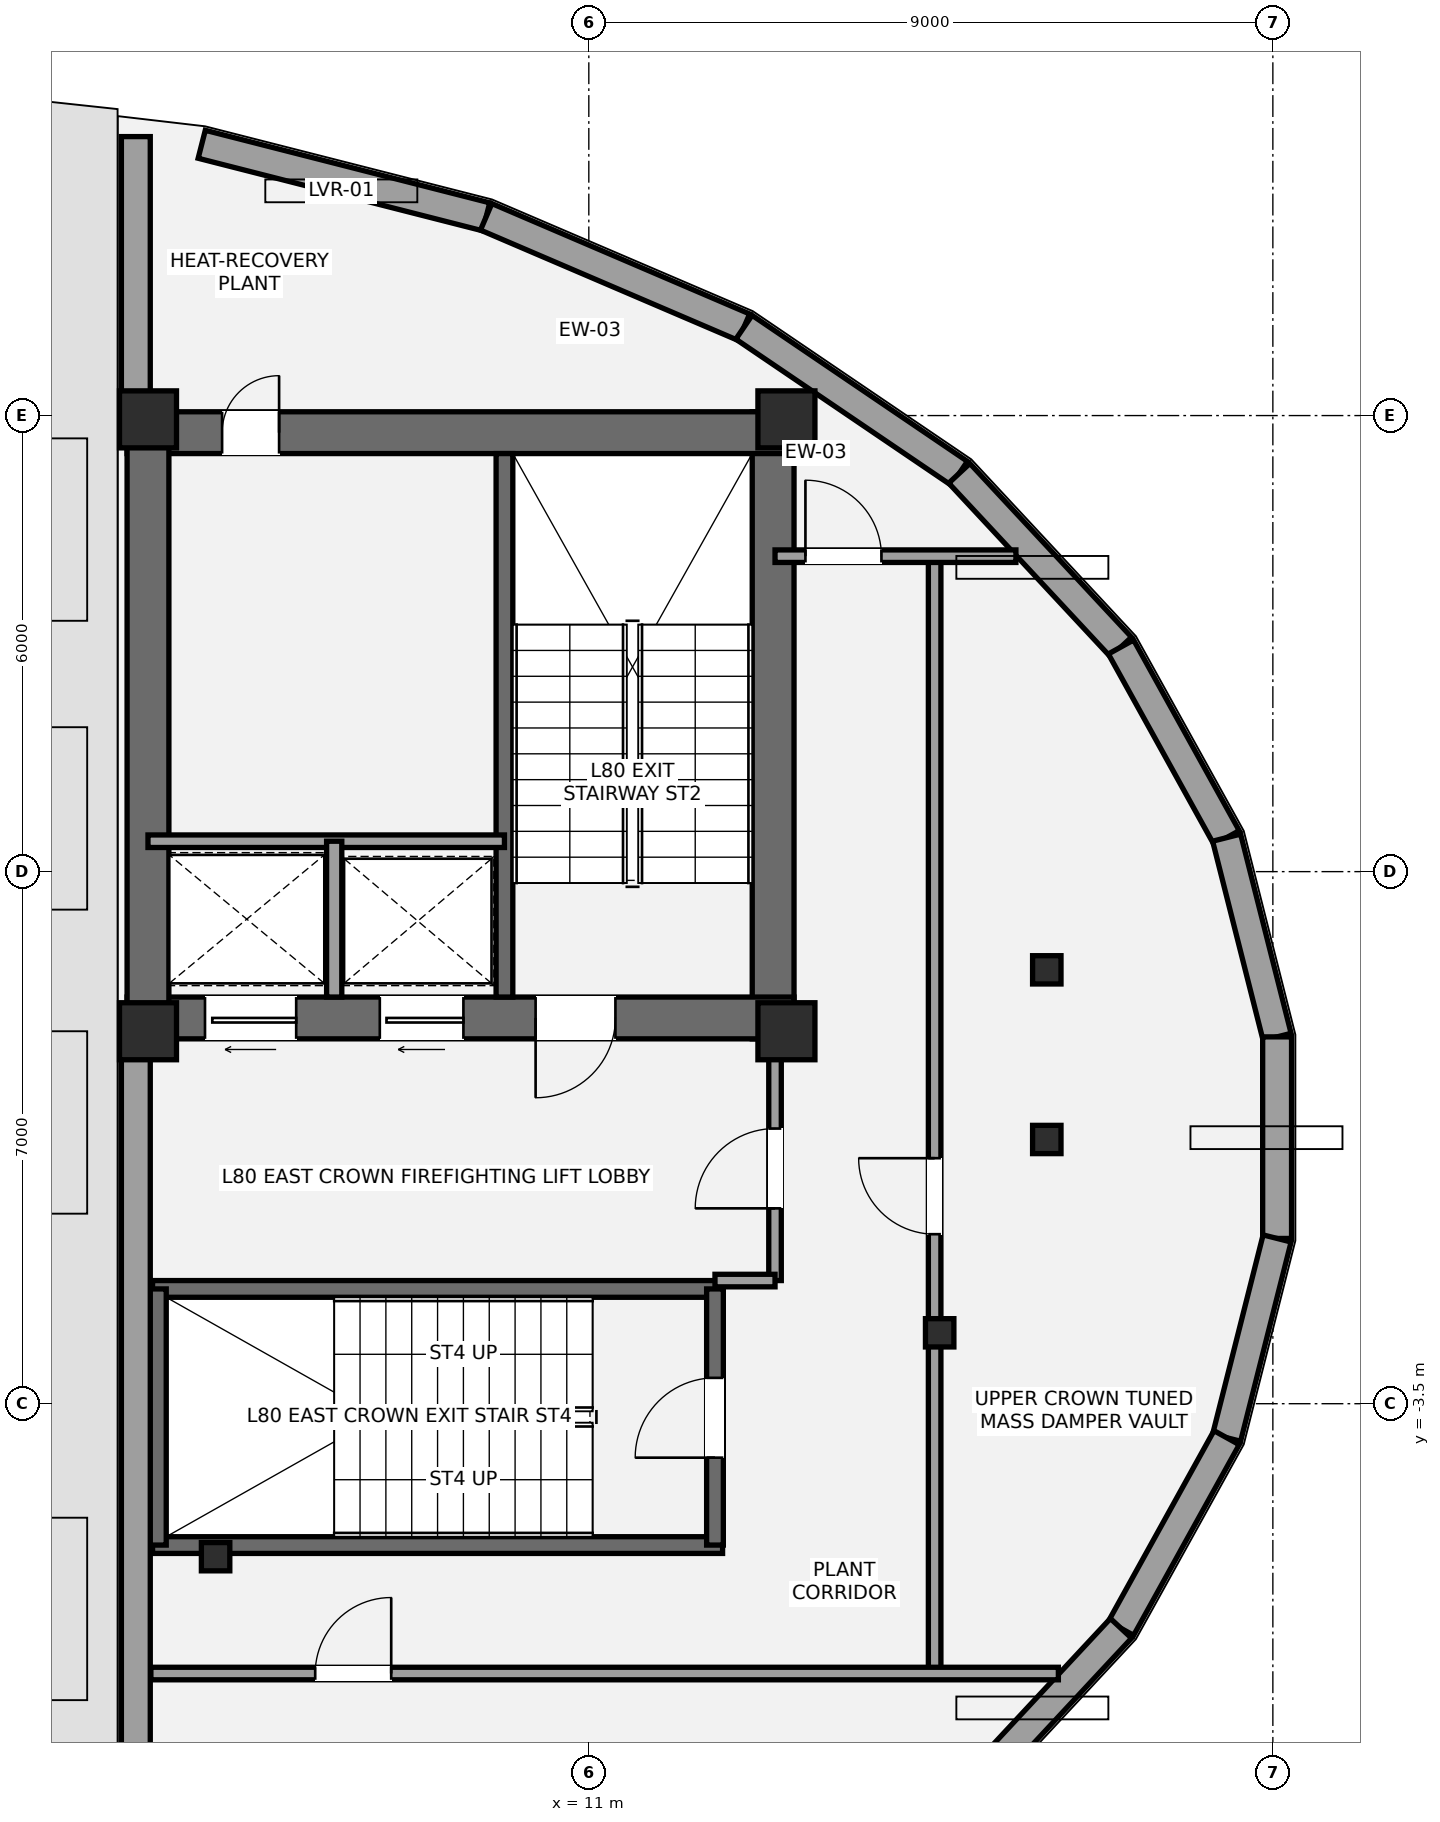
"""IFC4 building model, lengths in metres.
Left out: names, types, materials, properties, quantities, classifications, styles, units other than length and angle.
Written with IfcOpenShell. Run it as: python <this file> out.ifc"""

import sys

from ifc_helpers import new_model, si_unit, direction, frame, frame_2d, origin, origin_2d, place, context, subcontext, project, spatial, rectangle, i_section, extrude, element, fill, save


model = new_model("IFC4")
c1 = context("Model", 3, precision=1e-05, world=origin(), true_north=direction((0.0, 1.0)))
c2 = subcontext(c1, "Body", "Model", "MODEL_VIEW")
j1 = project(units=[si_unit("LENGTHUNIT", "METRE"), si_unit("PLANEANGLEUNIT", "RADIAN")], contexts=[c1])
p1 = place(None, origin())
s1 = spatial("IfcSite", under=j1, at=p1, CompositionType="ELEMENT")
p2 = place(p1, origin())
s2 = spatial("IfcBuilding", under=s1, at=p2, CompositionType="ELEMENT")
p3 = place(p2, frame((0.0, 0.0, 284.4)))
s3 = spatial("IfcBuildingStorey", under=s2, at=p3, CompositionType="ELEMENT", Elevation=284.4)
p4 = place(p3, frame((13.425, 1.3, 0.0), z_axis=(0.0, 0.0, 1.0), x_axis=(0.0, 1.0, 0.0)))
e1 = element("IfcWall", 1, at=p4, inside=s3, PredefinedType="SHEAR", context=c2, shape_type="SweptSolid", body=[
    extrude(rectangle(XDim=8.25, YDim=0.55, at=frame_2d((4.125, 0.0))), origin(), (0.0, 0.0, 1.0), 3.8),
])
p5 = place(p3, frame((4.925, 9.275, 0.0), z_axis=(0.0, 0.0, 1.0), x_axis=(1.0, 0.0, 0.0)))
e2 = element("IfcWall", 2, at=p5, inside=s3, PredefinedType="SHEAR", context=c2, shape_type="SweptSolid", body=[
    extrude(rectangle(XDim=8.775, YDim=0.55, at=frame_2d((4.387, 0.0))), origin(), (0.0, 0.0, 1.0), 3.8),
])
p6 = place(p5, frame((1.25, 0.0, 0.0)))
e3 = element("IfcOpeningElement", 3, at=p6, cuts=e2, PredefinedType="OPENING", context=c2, shape_type="SweptSolid", body=[
    extrude(rectangle(XDim=0.75, YDim=2.1, at=frame_2d((0.375, 1.05))), frame((0.0, 0.285, 0.0), z_axis=(0.0, -1.0, 0.0), x_axis=(1.0, 0.0, 0.0)), (0.0, 0.0, 1.0), 0.57),
])
p7 = place(p3, frame((13.7, 1.575, 0.0), z_axis=(0.0, 0.0, 1.0), x_axis=(-1.0, 0.0, 0.0)))
e4 = element("IfcWall", 4, at=p7, inside=s3, PredefinedType="SHEAR", context=c2, shape_type="SweptSolid", body=[
    extrude(rectangle(XDim=8.775, YDim=0.55, at=frame_2d((4.387, 0.0))), origin(), (0.0, 0.0, 1.0), 3.8),
])
p8 = place(p7, frame((2.35, 0.0, 0.0)))
e5 = element("IfcOpeningElement", 5, at=p8, cuts=e4, PredefinedType="OPENING", context=c2, shape_type="SweptSolid", body=[
    extrude(rectangle(XDim=1.05, YDim=2.15, at=frame_2d((0.525, 1.075))), frame((0.0, 0.285, 0.0), z_axis=(0.0, -1.0, 0.0), x_axis=(1.0, 0.0, 0.0)), (0.0, 0.0, 1.0), 0.57),
])
p9 = place(p7, frame((6.55, 0.0, 0.0)))
e6 = element("IfcOpeningElement", 6, at=p9, cuts=e4, PredefinedType="OPENING", context=c2, shape_type="SweptSolid", body=[
    extrude(rectangle(XDim=1.2, YDim=2.2, at=frame_2d((0.6, 1.1))), frame((0.0, 0.285, 0.0), z_axis=(0.0, -1.0, 0.0), x_axis=(1.0, 0.0, 0.0)), (0.0, 0.0, 1.0), 0.57),
])
p10 = place(p7, frame((4.35, 0.0, 0.0)))
e7 = element("IfcOpeningElement", 7, at=p10, cuts=e4, PredefinedType="OPENING", context=c2, shape_type="SweptSolid", body=[
    extrude(rectangle(XDim=1.1, YDim=2.2, at=frame_2d((0.55, 1.1))), frame((0.0, 0.285, 0.0), z_axis=(0.0, -1.0, 0.0), x_axis=(1.0, 0.0, 0.0)), (0.0, 0.0, 1.0), 0.57),
])
p11 = place(p3, frame((5.2, 1.3, 0.0), z_axis=(0.0, 0.0, 1.0), x_axis=(0.0, 1.0, 0.0)))
e8 = element("IfcWall", 8, at=p11, inside=s3, PredefinedType="SHEAR", context=c2, shape_type="SweptSolid", body=[
    extrude(rectangle(XDim=8.25, YDim=0.55, at=frame_2d((4.125, 0.0))), origin(), (0.0, 0.0, 1.0), 3.8),
])
p12 = place(p3, frame((9.89, 1.85, 0.0), z_axis=(0.0, 0.0, 1.0), x_axis=(0.0, 1.0, 0.0)))
e9 = element("IfcWall", 9, at=p12, inside=s3, PredefinedType="SHEAR", context=c2, shape_type="SweptSolid", body=[
    extrude(rectangle(XDim=7.15, YDim=0.22, at=frame_2d((3.575, 0.0))), origin(), (0.0, 0.0, 1.0), 3.8),
])
for number, where, z_axis, x_axis in (
    (10, (5.26, -1.99, 0.0), (0.0, 0.0, 1.0), (1.0, 0.0, 0.0)),
    (11, (5.26, -5.36, 0.0), (0.0, 0.0, 1.0), (1.0, 0.0, 0.0)),
):
    element("IfcWall", number, at=place(p3, frame(where, z_axis=z_axis, x_axis=x_axis)), inside=s3, PredefinedType="SHEAR", context=c2, shape_type="SweptSolid", body=[
        extrude(rectangle(XDim=7.5, YDim=0.22, at=frame_2d((3.75, 0.0))), origin(), (0.0, 0.0, 1.0), 3.8),
    ])
p13 = place(p3, frame((5.33, -5.36, 0.0), z_axis=(0.0, 0.0, 1.0), x_axis=(0.0, 1.0, 0.0)))
e12 = element("IfcWall", 12, at=p13, inside=s3, PredefinedType="SHEAR", context=c2, shape_type="SweptSolid", body=[
    extrude(rectangle(XDim=3.37, YDim=0.22, at=frame_2d((1.685, 0.0))), origin(), (0.0, 0.0, 1.0), 3.8),
])
p14 = place(p3, frame((12.66, -5.36, 0.0), z_axis=(0.0, 0.0, 1.0), x_axis=(0.0, 1.0, 0.0)))
e13 = element("IfcWall", 13, at=p14, inside=s3, PredefinedType="SHEAR", context=c2, shape_type="SweptSolid", body=[
    extrude(rectangle(XDim=3.37, YDim=0.22, at=frame_2d((1.685, 0.0))), origin(), (0.0, 0.0, 1.0), 3.8),
])
p15 = place(p14, frame((1.15, 0.0, 0.0)))
e14 = element("IfcOpeningElement", 14, at=p15, cuts=e13, PredefinedType="OPENING", context=c2, shape_type="SweptSolid", body=[
    extrude(rectangle(XDim=1.05, YDim=2.15, at=frame_2d((0.525, 1.075))), frame((0.0, 0.12, 0.0), z_axis=(0.0, -1.0, 0.0), x_axis=(1.0, 0.0, 0.0)), (0.0, 0.0, 1.0), 0.24),
])
for number, where, z_axis, x_axis in (
    (15, (5.2, 1.4, 0.0), (0.0, 0.0, 1.0), (1.0, 0.0, 0.0)),
    (16, (5.2, 9.45, 0.0), (0.0, 0.0, 1.0), (1.0, 0.0, 0.0)),
    (17, (13.6, 1.4, 0.0), (0.0, 0.0, 1.0), (1.0, 0.0, 0.0)),
    (18, (13.6, 9.45, 0.0), (0.0, 0.0, 1.0), (1.0, 0.0, 0.0)),
):
    element("IfcColumn", number, at=place(p3, frame(where, z_axis=z_axis, x_axis=x_axis)), inside=s3, PredefinedType="PILASTER", context=c2, shape_type="SweptSolid", body=[
        extrude(rectangle(XDim=0.75, YDim=0.75, at=origin_2d()), origin(), (0.0, 0.0, 1.0), 3.8),
    ])
for number, where, z_axis, x_axis in (
    (19, (17.026, 2.208, 0.0), (0.0, 0.0, 1.0), (1.0, 0.0, 0.0)),
    (20, (6.09, -5.513, 0.0), (0.0, 0.0, 1.0), (1.0, 0.0, 0.0)),
    (21, (15.616, -2.567, 0.0), (0.0, 0.0, 1.0), (1.0, 0.0, 0.0)),
    (22, (17.026, -0.024, 0.0), (0.0, 0.0, 1.0), (1.0, 0.0, 0.0)),
):
    element("IfcColumn", number, at=place(p3, frame(where, z_axis=z_axis, x_axis=x_axis)), inside=s3, PredefinedType="COLUMN", context=c2, shape_type="SweptSolid", body=[
        extrude(i_section(OverallWidth=0.374, OverallDepth=0.372, WebThickness=0.016, FlangeThickness=0.026, at=origin_2d()), origin(), (0.0, 0.0, 1.0), 3.8),
    ])
p16 = place(p3, frame((9.649, 12.115, 0.0), z_axis=(0.0, 0.0, 1.0), x_axis=(-0.969005337837, 0.247039784739, 0.0)))
e23 = element("IfcWall", 23, at=p16, inside=s3, PredefinedType="ELEMENTEDWALL", context=c2, shape_type="SweptSolid", body=[
    extrude(rectangle(XDim=3.862, YDim=0.38, at=frame_2d((1.931, 0.0))), origin(), (0.0, 0.0, 1.0), 2.97),
])
p17 = place(p3, frame((13.041, 10.662, 0.0), z_axis=(0.0, 0.0, 1.0), x_axis=(-0.919244249846, 0.393687705073, 0.0)))
e24 = element("IfcWall", 24, at=p17, inside=s3, PredefinedType="ELEMENTEDWALL", context=c2, shape_type="SweptSolid", body=[
    extrude(rectangle(XDim=3.69, YDim=0.38, at=frame_2d((1.845, 0.0))), origin(), (0.0, 0.0, 1.0), 2.97),
])
p18 = place(p3, frame((15.875, 8.741, 0.0), z_axis=(0.0, 0.0, 1.0), x_axis=(-0.82760237515, 0.561314803516, 0.0)))
e25 = element("IfcWall", 25, at=p18, inside=s3, PredefinedType="ELEMENTEDWALL", context=c2, shape_type="SweptSolid", body=[
    extrude(rectangle(XDim=3.423, YDim=0.38, at=frame_2d((1.712, 0.0))), origin(), (0.0, 0.0, 1.0), 2.97),
])
p19 = place(p3, frame((18.002, 6.456, 0.0), z_axis=(0.0, 0.0, 1.0), x_axis=(-0.681356413762, 0.731951799933, 0.0)))
e26 = element("IfcWall", 26, at=p19, inside=s3, PredefinedType="ELEMENTEDWALL", context=c2, shape_type="SweptSolid", body=[
    extrude(rectangle(XDim=3.122, YDim=0.38, at=frame_2d((1.561, 0.0))), origin(), (0.0, 0.0, 1.0), 2.97),
])
p20 = place(p3, frame((19.392, 3.947, 0.0), z_axis=(0.0, 0.0, 1.0), x_axis=(-0.484710278861, 0.874674765594, 0.0)))
e27 = element("IfcWall", 27, at=p20, inside=s3, PredefinedType="ELEMENTEDWALL", context=c2, shape_type="SweptSolid", body=[
    extrude(rectangle(XDim=2.868, YDim=0.38, at=frame_2d((1.434, 0.0))), origin(), (0.0, 0.0, 1.0), 2.97),
])
p21 = place(p3, frame((20.056, 1.326, 0.0), z_axis=(0.0, 0.0, 1.0), x_axis=(-0.245593718024, 0.969372851728, 0.0)))
e28 = element("IfcWall", 28, at=p21, inside=s3, PredefinedType="ELEMENTEDWALL", context=c2, shape_type="SweptSolid", body=[
    extrude(rectangle(XDim=2.704, YDim=0.38, at=frame_2d((1.352, 0.0))), origin(), (0.0, 0.0, 1.0), 2.97),
])
p22 = place(p3, frame((20.056, -1.326, 0.0), z_axis=(0.0, 0.0, 1.0), x_axis=(0.0, 1.0, 0.0)))
e29 = element("IfcWall", 29, at=p22, inside=s3, PredefinedType="ELEMENTEDWALL", context=c2, shape_type="SweptSolid", body=[
    extrude(rectangle(XDim=2.652, YDim=0.38, at=frame_2d((1.326, 0.0))), origin(), (0.0, 0.0, 1.0), 2.97),
])
p23 = place(p3, frame((19.392, -3.947, 0.0), z_axis=(0.0, 0.0, 1.0), x_axis=(0.245593718024, 0.969372851728, 0.0)))
e30 = element("IfcWall", 30, at=p23, inside=s3, PredefinedType="ELEMENTEDWALL", context=c2, shape_type="SweptSolid", body=[
    extrude(rectangle(XDim=2.704, YDim=0.38, at=frame_2d((1.352, 0.0))), origin(), (0.0, 0.0, 1.0), 2.97),
])
p24 = place(p3, frame((18.002, -6.456, 0.0), z_axis=(0.0, 0.0, 1.0), x_axis=(0.484710278861, 0.874674765594, 0.0)))
e31 = element("IfcWall", 31, at=p24, inside=s3, PredefinedType="ELEMENTEDWALL", context=c2, shape_type="SweptSolid", body=[
    extrude(rectangle(XDim=2.868, YDim=0.38, at=frame_2d((1.434, 0.0))), origin(), (0.0, 0.0, 1.0), 2.97),
])
p25 = place(p3, frame((15.875, -8.741, 0.0), z_axis=(0.0, 0.0, 1.0), x_axis=(0.681356413762, 0.731951799933, 0.0)))
e32 = element("IfcWall", 32, at=p25, inside=s3, PredefinedType="ELEMENTEDWALL", context=c2, shape_type="SweptSolid", body=[
    extrude(rectangle(XDim=3.122, YDim=0.38, at=frame_2d((1.561, 0.0))), origin(), (0.0, 0.0, 1.0), 2.97),
])
p26 = place(p3, frame((5.04, 13.17, 0.0), z_axis=(0.0, 0.0, 1.0), x_axis=(0.0, -1.0, 0.0)))
e33 = element("IfcWall", 33, at=p26, inside=s3, PredefinedType="ELEMENTEDWALL", context=c2, shape_type="SweptSolid", body=[
    extrude(rectangle(XDim=3.54, YDim=0.38, at=frame_2d((1.77, 0.0))), origin(), (0.0, 0.0, 1.0), 2.97),
])
p27 = place(p3, frame((5.04, 1.22, 0.0), z_axis=(0.0, 0.0, 1.0), x_axis=(0.0, -1.0, 0.0)))
e34 = element("IfcWall", 34, at=p27, inside=s3, PredefinedType="ELEMENTEDWALL", context=c2, shape_type="SweptSolid", body=[
    extrude(rectangle(XDim=14.39, YDim=0.38, at=frame_2d((7.195, 0.0))), origin(), (0.0, 0.0, 1.0), 2.97),
])
p28 = place(p3, frame((5.2, 3.9, 0.0), z_axis=(0.0, 0.0, 1.0), x_axis=(1.0, 0.0, 0.0)))
e35 = element("IfcWall", 35, at=p28, inside=s3, PredefinedType="PARTITIONING", context=c2, shape_type="SweptSolid", body=[
    extrude(rectangle(XDim=4.69, YDim=0.165, at=frame_2d((2.345, 0.0))), origin(), (0.0, 0.0, 1.0), 3.6),
])
p29 = place(p3, frame((7.65, 1.85, 0.0), z_axis=(0.0, 0.0, 1.0), x_axis=(0.0, 1.0, 0.0)))
e36 = element("IfcWall", 36, at=p29, inside=s3, PredefinedType="SOLIDWALL", context=c2, shape_type="SweptSolid", body=[
    extrude(rectangle(XDim=2.05, YDim=0.2, at=frame_2d((1.025, 0.0))), origin(), (0.0, 0.0, 1.0), 3.6),
])
p30 = place(p3, frame((13.45, -1.88, 0.0), z_axis=(0.0, 0.0, 1.0), x_axis=(0.0, 1.0, 0.0)))
e37 = element("IfcWall", 37, at=p30, inside=s3, PredefinedType="PARTITIONING", context=c2, shape_type="SweptSolid", body=[
    extrude(rectangle(XDim=3.23, YDim=0.165, at=frame_2d((1.615, 0.0))), origin(), (0.0, 0.0, 1.0), 3.061),
])
p31 = place(p30, frame((0.95, 0.0, 0.0)))
e38 = element("IfcOpeningElement", 38, at=p31, cuts=e37, PredefinedType="OPENING", context=c2, shape_type="SweptSolid", body=[
    extrude(rectangle(XDim=1.05, YDim=2.15, at=frame_2d((0.525, 1.075))), frame((0.0, 0.093, 0.0), z_axis=(0.0, -1.0, 0.0), x_axis=(1.0, 0.0, 0.0)), (0.0, 0.0, 1.0), 0.185),
])
p32 = place(p3, frame((12.66, -1.88, 0.0), z_axis=(0.0, 0.0, 1.0), x_axis=(1.0, 0.0, 0.0)))
e39 = element("IfcWall", 39, at=p32, inside=s3, PredefinedType="PARTITIONING", context=c2, shape_type="SweptSolid", body=[
    extrude(rectangle(XDim=0.79, YDim=0.165, at=frame_2d((0.395, 0.0))), origin(), (0.0, 0.0, 1.0), 3.061),
])
p33 = place(p3, frame((15.55, -7.05, 0.0), z_axis=(0.0, 0.0, 1.0), x_axis=(0.0, 1.0, 0.0)))
e40 = element("IfcWall", 40, at=p33, inside=s3, PredefinedType="PARTITIONING", context=c2, shape_type="SweptSolid", body=[
    extrude(rectangle(XDim=14.7, YDim=0.165, at=frame_2d((7.35, 0.0))), origin(), (0.0, 0.0, 1.0), 2.987),
])
p34 = place(p33, frame((5.78, 0.0, 0.0)))
e41 = element("IfcOpeningElement", 41, at=p34, cuts=e40, PredefinedType="OPENING", context=c2, shape_type="SweptSolid", body=[
    extrude(rectangle(XDim=1.0, YDim=2.15, at=frame_2d((0.5, 1.075))), frame((0.0, 0.093, 0.0), z_axis=(0.0, -1.0, 0.0), x_axis=(1.0, 0.0, 0.0)), (0.0, 0.0, 1.0), 0.185),
])
p35 = place(p3, frame((5.238, -7.05, 0.0), z_axis=(0.0, 0.0, 1.0), x_axis=(1.0, 0.0, 0.0)))
e42 = element("IfcWall", 42, at=p35, inside=s3, PredefinedType="PARTITIONING", context=c2, shape_type="SweptSolid", body=[
    extrude(rectangle(XDim=11.94, YDim=0.165, at=frame_2d((5.97, 0.0))), origin(), (0.0, 0.0, 1.0), 2.968),
])
p36 = place(p35, frame((2.162, 0.0, 0.0)))
e43 = element("IfcOpeningElement", 43, at=p36, cuts=e42, PredefinedType="OPENING", context=c2, shape_type="SweptSolid", body=[
    extrude(rectangle(XDim=1.0, YDim=2.15, at=frame_2d((0.5, 1.075))), frame((0.0, 0.093, 0.0), z_axis=(0.0, -1.0, 0.0), x_axis=(1.0, 0.0, 0.0)), (0.0, 0.0, 1.0), 0.185),
])
p37 = place(p3, frame((13.45, 7.65, 0.0), z_axis=(0.0, 0.0, 1.0), x_axis=(1.0, 0.0, 0.0)))
e44 = element("IfcWall", 44, at=p37, inside=s3, PredefinedType="PARTITIONING", context=c2, shape_type="SweptSolid", body=[
    extrude(rectangle(XDim=3.169, YDim=0.165, at=frame_2d((1.585, 0.0))), origin(), (0.0, 0.0, 1.0), 2.968),
])
p38 = place(p37, frame((0.4, 0.0, 0.0)))
e45 = element("IfcOpeningElement", 45, at=p38, cuts=e44, PredefinedType="OPENING", context=c2, shape_type="SweptSolid", body=[
    extrude(rectangle(XDim=1.0, YDim=2.15, at=frame_2d((0.5, 1.075))), frame((0.0, 0.093, 0.0), z_axis=(0.0, -1.0, 0.0), x_axis=(1.0, 0.0, 0.0)), (0.0, 0.0, 1.0), 0.185),
])
p39 = place(p31, origin())
e46 = element("IfcDoor", 46, at=p39, inside=s3, OperationType="SINGLE_SWING_LEFT", PredefinedType="DOOR", context=c2, shape_type="SweptSolid", body=[
    extrude(rectangle(XDim=1.05, YDim=2.15, at=frame_2d((0.525, 1.075))), frame((0.0, 0.025, 0.0), z_axis=(0.0, -1.0, 0.0), x_axis=(1.0, 0.0, 0.0)), (0.0, 0.0, 1.0), 0.05),
])
fill(e38, e46)
p40 = place(p8, origin())
e47 = element("IfcDoor", 47, at=p40, inside=s3, OperationType="SINGLE_SWING_RIGHT", PredefinedType="DOOR", context=c2, shape_type="SweptSolid", body=[
    extrude(rectangle(XDim=1.05, YDim=2.15, at=frame_2d((0.525, 1.075))), frame((0.0, 0.025, 0.0), z_axis=(0.0, -1.0, 0.0), x_axis=(1.0, 0.0, 0.0)), (0.0, 0.0, 1.0), 0.05),
])
fill(e5, e47)
p41 = place(p15, origin())
e48 = element("IfcDoor", 48, at=p41, inside=s3, OperationType="SINGLE_SWING_LEFT", PredefinedType="DOOR", context=c2, shape_type="SweptSolid", body=[
    extrude(rectangle(XDim=1.05, YDim=2.15, at=frame_2d((0.525, 1.075))), frame((0.0, 0.025, 0.0), z_axis=(0.0, -1.0, 0.0), x_axis=(1.0, 0.0, 0.0)), (0.0, 0.0, 1.0), 0.05),
])
fill(e14, e48)
p42 = place(p6, origin())
e49 = element("IfcDoor", 49, at=p42, inside=s3, OperationType="SINGLE_SWING_RIGHT", PredefinedType="DOOR", context=c2, shape_type="SweptSolid", body=[
    extrude(rectangle(XDim=0.75, YDim=2.1, at=frame_2d((0.375, 1.05))), frame((0.0, 0.025, 0.0), z_axis=(0.0, -1.0, 0.0), x_axis=(1.0, 0.0, 0.0)), (0.0, 0.0, 1.0), 0.05),
])
fill(e3, e49)
p43 = place(p9, origin())
e50 = element("IfcDoor", 50, at=p43, inside=s3, OperationType="SLIDING_TO_RIGHT", PredefinedType="DOOR", context=c2, shape_type="SweptSolid", body=[
    extrude(rectangle(XDim=1.2, YDim=2.2, at=frame_2d((0.6, 1.1))), frame((0.0, 0.025, 0.0), z_axis=(0.0, -1.0, 0.0), x_axis=(1.0, 0.0, 0.0)), (0.0, 0.0, 1.0), 0.05),
])
fill(e6, e50)
p44 = place(p10, origin())
e51 = element("IfcDoor", 51, at=p44, inside=s3, OperationType="SLIDING_TO_LEFT", PredefinedType="DOOR", context=c2, shape_type="SweptSolid", body=[
    extrude(rectangle(XDim=1.1, YDim=2.2, at=frame_2d((0.55, 1.1))), frame((0.0, 0.025, 0.0), z_axis=(0.0, -1.0, 0.0), x_axis=(1.0, 0.0, 0.0)), (0.0, 0.0, 1.0), 0.05),
])
fill(e7, e51)
p45 = place(p38, origin())
e52 = element("IfcDoor", 52, at=p45, inside=s3, OperationType="SINGLE_SWING_LEFT", PredefinedType="DOOR", context=c2, shape_type="SweptSolid", body=[
    extrude(rectangle(XDim=1.0, YDim=2.15, at=frame_2d((0.5, 1.075))), frame((0.0, 0.025, 0.0), z_axis=(0.0, -1.0, 0.0), x_axis=(1.0, 0.0, 0.0)), (0.0, 0.0, 1.0), 0.05),
])
fill(e45, e52)
p46 = place(p36, origin())
e53 = element("IfcDoor", 53, at=p46, inside=s3, OperationType="SINGLE_SWING_RIGHT", PredefinedType="DOOR", context=c2, shape_type="SweptSolid", body=[
    extrude(rectangle(XDim=1.0, YDim=2.15, at=frame_2d((0.5, 1.075))), frame((0.0, 0.025, 0.0), z_axis=(0.0, -1.0, 0.0), x_axis=(1.0, 0.0, 0.0)), (0.0, 0.0, 1.0), 0.05),
])
fill(e43, e53)
p47 = place(p34, origin())
e54 = element("IfcDoor", 54, at=p47, inside=s3, OperationType="SINGLE_SWING_RIGHT", PredefinedType="DOOR", context=c2, shape_type="SweptSolid", body=[
    extrude(rectangle(XDim=1.0, YDim=2.15, at=frame_2d((0.5, 1.075))), frame((0.0, 0.025, 0.0), z_axis=(0.0, -1.0, 0.0), x_axis=(1.0, 0.0, 0.0)), (0.0, 0.0, 1.0), 0.05),
])
fill(e41, e54)
save(model, sys.argv[1])
